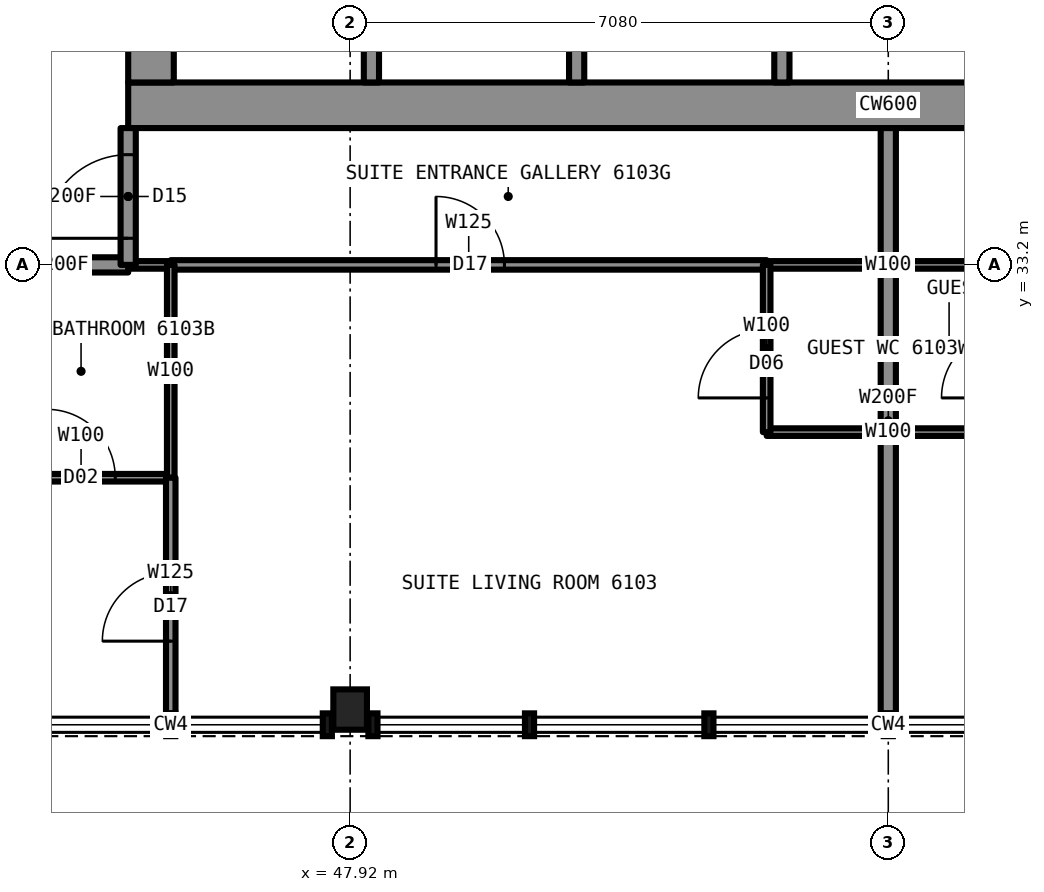
"""IFC4 building model, lengths in metres.
Left out: names, types, materials, properties, quantities, classifications, styles, units other than length and angle.
Written with IfcOpenShell. Run it as: python <this file> out.ifc"""

import sys

from ifc_helpers import new_model, si_unit, direction, frame, frame_2d, origin, origin_2d, place, context, subcontext, project, spatial, rectangle, i_section, extrude, element, fill, save


model = new_model("IFC4")
c1 = context("Model", 3, precision=1e-05, world=origin(), true_north=direction((0.0, 1.0)))
c2 = subcontext(c1, "Body", "Model", "MODEL_VIEW")
j1 = project(units=[si_unit("LENGTHUNIT", "METRE"), si_unit("PLANEANGLEUNIT", "RADIAN")], contexts=[c1])
p1 = place(None, origin())
s1 = spatial("IfcSite", under=j1, at=p1, CompositionType="ELEMENT")
p2 = place(p1, origin())
s2 = spatial("IfcBuilding", under=s1, at=p2, CompositionType="ELEMENT")
p3 = place(p2, frame((0.0, 0.0, 226.7)))
s3 = spatial("IfcBuildingStorey", under=s2, at=p3, CompositionType="ELEMENT", Elevation=226.7)
p4 = place(p3, frame((47.92, 27.35, 0.0), z_axis=(0.0, 0.0, 1.0), x_axis=(1.0, 0.0, 0.0)))
e1 = element("IfcColumn", 1, at=p4, inside=s3, PredefinedType="COLUMN", context=c2, shape_type="SweptSolid", body=[
    extrude(i_section(OverallWidth=0.442, OverallDepth=0.531, WebThickness=0.066, FlangeThickness=0.106, at=origin_2d()), origin(), (0.0, 0.0, 1.0), 3.5),
])
p5 = place(p3, frame((45.0, 35.3, 0.0), z_axis=(0.0, 0.0, 1.0), x_axis=(1.0, 0.0, 0.0)))
e2 = element("IfcWall", 2, at=p5, inside=s3, PredefinedType="SHEAR", context=c2, shape_type="SweptSolid", body=[
    extrude(rectangle(XDim=20.0, YDim=0.6, at=frame_2d((10.0, 0.0))), origin(), (0.0, 0.0, 1.0), 3.5),
])
p6 = place(p3, frame((45.3, 35.6, 0.0), z_axis=(0.0, 0.0, 1.0), x_axis=(0.0, 1.0, 0.0)))
e3 = element("IfcWall", 3, at=p6, inside=s3, PredefinedType="SHEAR", context=c2, shape_type="SweptSolid", body=[
    extrude(rectangle(XDim=18.8, YDim=0.6, at=frame_2d((9.4, 0.0))), origin(), (0.0, 0.0, 1.0), 3.5),
])
p7 = place(p6, frame((13.4, 0.0, 0.0)))
e4 = element("IfcOpeningElement", 4, at=p7, cuts=e3, PredefinedType="OPENING", context=c2, shape_type="SweptSolid", body=[
    extrude(rectangle(XDim=1.8, YDim=2.2, at=frame_2d((0.9, 1.1))), frame((0.0, 0.31, 0.0), z_axis=(0.0, -1.0, 0.0), x_axis=(1.0, 0.0, 0.0)), (0.0, 0.0, 1.0), 0.62),
])
p8 = place(p6, frame((3.6, 0.0, 0.0)))
e5 = element("IfcOpeningElement", 5, at=p8, cuts=e3, PredefinedType="OPENING", context=c2, shape_type="SweptSolid", body=[
    extrude(rectangle(XDim=1.8, YDim=2.2, at=frame_2d((0.9, 1.1))), frame((0.0, 0.31, 0.0), z_axis=(0.0, -1.0, 0.0), x_axis=(1.0, 0.0, 0.0)), (0.0, 0.0, 1.0), 0.62),
])
p9 = place(p6, frame((6.4, 0.0, 0.0)))
e6 = element("IfcOpeningElement", 6, at=p9, cuts=e3, PredefinedType="OPENING", context=c2, shape_type="SweptSolid", body=[
    extrude(rectangle(XDim=1.2, YDim=2.2, at=frame_2d((0.6, 1.1))), frame((0.0, 0.31, 0.0), z_axis=(0.0, -1.0, 0.0), x_axis=(1.0, 0.0, 0.0)), (0.0, 0.0, 1.0), 0.62),
])
p10 = place(p3, frame((45.0, 33.2, 0.0), z_axis=(0.0, 0.0, 1.0), x_axis=(1.0, 0.0, 0.0)))
e7 = element("IfcWall", 7, at=p10, inside=s3, PredefinedType="PARTITIONING", context=c2, shape_type="SweptSolid", body=[
    extrude(rectangle(XDim=0.56, YDim=0.1, at=frame_2d((0.28, 0.0))), origin(), (0.0, 0.0, 1.0), 3.33),
])
p11 = place(p3, frame((53.4, 33.2, 0.0), z_axis=(0.0, 0.0, 1.0), x_axis=(1.0, 0.0, 0.0)))
e8 = element("IfcWall", 8, at=p11, inside=s3, PredefinedType="PARTITIONING", context=c2, shape_type="SweptSolid", body=[
    extrude(rectangle(XDim=3.2, YDim=0.1, at=frame_2d((1.6, 0.0))), origin(), (0.0, 0.0, 1.0), 3.33),
])
p12 = place(p3, frame((43.2, 33.2, 0.0), z_axis=(0.0, 0.0, 1.0), x_axis=(1.0, 0.0, 0.0)))
e9 = element("IfcWall", 9, at=p12, inside=s3, PredefinedType="PARTITIONING", context=c2, shape_type="SweptSolid", body=[
    extrude(rectangle(XDim=1.8, YDim=0.2, at=frame_2d((0.9, 0.0))), origin(), (0.0, 0.0, 1.0), 3.33),
])
p13 = place(p3, frame((45.56, 33.2, 0.0), z_axis=(0.0, 0.0, 1.0), x_axis=(1.0, 0.0, 0.0)))
e10 = element("IfcWall", 10, at=p13, inside=s3, PredefinedType="PARTITIONING", context=c2, shape_type="SweptSolid", body=[
    extrude(rectangle(XDim=7.84, YDim=0.125, at=frame_2d((3.92, 0.0))), origin(), (0.0, 0.0, 1.0), 3.33),
])
p14 = place(p13, frame((3.49, 0.0, 0.0)))
e11 = element("IfcOpeningElement", 11, at=p14, cuts=e10, PredefinedType="OPENING", context=c2, shape_type="SweptSolid", body=[
    extrude(rectangle(XDim=0.9, YDim=2.2, at=frame_2d((0.45, 1.1))), frame((0.0, 0.073, 0.0), z_axis=(0.0, -1.0, 0.0), x_axis=(1.0, 0.0, 0.0)), (0.0, 0.0, 1.0), 0.145),
])
p15 = place(p3, frame((53.4, 31.0, 0.0), z_axis=(0.0, 0.0, 1.0), x_axis=(1.0, 0.0, 0.0)))
e12 = element("IfcWall", 12, at=p15, inside=s3, PredefinedType="PARTITIONING", context=c2, shape_type="SweptSolid", body=[
    extrude(rectangle(XDim=3.2, YDim=0.1, at=frame_2d((1.6, 0.0))), origin(), (0.0, 0.0, 1.0), 3.33),
])
p16 = place(p3, frame((43.2, 30.4, 0.0), z_axis=(0.0, 0.0, 1.0), x_axis=(1.0, 0.0, 0.0)))
e13 = element("IfcWall", 13, at=p16, inside=s3, PredefinedType="PARTITIONING", context=c2, shape_type="SweptSolid", body=[
    extrude(rectangle(XDim=2.36, YDim=0.1, at=frame_2d((1.18, 0.0))), origin(), (0.0, 0.0, 1.0), 3.33),
])
p17 = place(p16, frame((0.73, 0.0, 0.0)))
e14 = element("IfcOpeningElement", 14, at=p17, cuts=e13, PredefinedType="OPENING", context=c2, shape_type="SweptSolid", body=[
    extrude(rectangle(XDim=0.9, YDim=2.1, at=frame_2d((0.45, 1.05))), frame((0.0, 0.06, 0.0), z_axis=(0.0, -1.0, 0.0), x_axis=(1.0, 0.0, 0.0)), (0.0, 0.0, 1.0), 0.12),
])
p18 = place(p3, frame((53.4, 31.0, 0.0), z_axis=(0.0, 0.0, 1.0), x_axis=(0.0, 1.0, 0.0)))
e15 = element("IfcWall", 15, at=p18, inside=s3, PredefinedType="PARTITIONING", context=c2, shape_type="SweptSolid", body=[
    extrude(rectangle(XDim=2.2, YDim=0.1, at=frame_2d((1.1, 0.0))), origin(), (0.0, 0.0, 1.0), 3.33),
])
p19 = place(p18, frame((0.45, 0.0, 0.0)))
e16 = element("IfcOpeningElement", 16, at=p19, cuts=e15, PredefinedType="OPENING", context=c2, shape_type="SweptSolid", body=[
    extrude(rectangle(XDim=0.9, YDim=2.1, at=frame_2d((0.45, 1.05))), frame((0.0, 0.06, 0.0), z_axis=(0.0, -1.0, 0.0), x_axis=(1.0, 0.0, 0.0)), (0.0, 0.0, 1.0), 0.12),
])
p20 = place(p3, frame((45.0, 33.2, 0.0), z_axis=(0.0, 0.0, 1.0), x_axis=(0.0, 1.0, 0.0)))
e17 = element("IfcWall", 17, at=p20, inside=s3, PredefinedType="PARTITIONING", context=c2, shape_type="SweptSolid", body=[
    extrude(rectangle(XDim=1.8, YDim=0.2, at=frame_2d((0.9, 0.0))), origin(), (0.0, 0.0, 1.0), 3.33),
])
p21 = place(p20, frame((0.35, 0.0, 0.0)))
e18 = element("IfcOpeningElement", 18, at=p21, cuts=e17, PredefinedType="OPENING", context=c2, shape_type="SweptSolid", body=[
    extrude(rectangle(XDim=1.1, YDim=2.2, at=frame_2d((0.55, 1.1))), frame((0.0, 0.11, 0.0), z_axis=(0.0, -1.0, 0.0), x_axis=(1.0, 0.0, 0.0)), (0.0, 0.0, 1.0), 0.22),
])
p22 = place(p3, frame((45.56, 30.4, 0.0), z_axis=(0.0, 0.0, 1.0), x_axis=(0.0, 1.0, 0.0)))
e19 = element("IfcWall", 19, at=p22, inside=s3, PredefinedType="PARTITIONING", context=c2, shape_type="SweptSolid", body=[
    extrude(rectangle(XDim=2.8, YDim=0.1, at=frame_2d((1.4, 0.0))), origin(), (0.0, 0.0, 1.0), 3.33),
])
p23 = place(p3, frame((45.56, 27.3, 0.0), z_axis=(0.0, 0.0, 1.0), x_axis=(0.0, 1.0, 0.0)))
e20 = element("IfcWall", 20, at=p23, inside=s3, PredefinedType="PARTITIONING", context=c2, shape_type="SweptSolid", body=[
    extrude(rectangle(XDim=3.1, YDim=0.125, at=frame_2d((1.55, 0.0))), origin(), (0.0, 0.0, 1.0), 3.33),
])
p24 = place(p23, frame((0.95, 0.0, 0.0)))
e21 = element("IfcOpeningElement", 21, at=p24, cuts=e20, PredefinedType="OPENING", context=c2, shape_type="SweptSolid", body=[
    extrude(rectangle(XDim=0.9, YDim=2.2, at=frame_2d((0.45, 1.1))), frame((0.0, 0.073, 0.0), z_axis=(0.0, -1.0, 0.0), x_axis=(1.0, 0.0, 0.0)), (0.0, 0.0, 1.0), 0.145),
])
p25 = place(p3, frame((55.0, 27.3, 0.0), z_axis=(0.0, 0.0, 1.0), x_axis=(0.0, 1.0, 0.0)))
e22 = element("IfcWall", 22, at=p25, inside=s3, PredefinedType="PARTITIONING", context=c2, shape_type="SweptSolid", body=[
    extrude(rectangle(XDim=7.7, YDim=0.2, at=frame_2d((3.85, 0.0))), origin(), (0.0, 0.0, 1.0), 2.573),
])
for number, where, z_axis, x_axis in (
    (23, (48.2, 35.6, 0.0), (0.0, 0.0, 1.0), (0.0, 1.0, 0.0)),
    (24, (50.9, 35.6, 0.0), (0.0, 0.0, 1.0), (0.0, 1.0, 0.0)),
    (25, (53.6, 35.6, 0.0), (0.0, 0.0, 1.0), (0.0, 1.0, 0.0)),
):
    element("IfcWall", number, at=place(p3, frame(where, z_axis=z_axis, x_axis=x_axis)), inside=s3, PredefinedType="PARTITIONING", context=c2, shape_type="SweptSolid", body=[
        extrude(rectangle(XDim=2.7, YDim=0.2, at=frame_2d((1.35, 0.0))), origin(), (0.0, 0.0, 1.0), 3.33),
    ])
p26 = place(p14, origin())
e26 = element("IfcDoor", 26, at=p26, inside=s3, OperationType="SINGLE_SWING_LEFT", PredefinedType="DOOR", context=c2, shape_type="SweptSolid", body=[
    extrude(rectangle(XDim=0.9, YDim=2.2, at=frame_2d((0.45, 1.1))), frame((0.0, 0.025, 0.0), z_axis=(0.0, -1.0, 0.0), x_axis=(1.0, 0.0, 0.0)), (0.0, 0.0, 1.0), 0.05),
])
fill(e11, e26)
p27 = place(p17, origin())
e27 = element("IfcDoor", 27, at=p27, inside=s3, OperationType="SINGLE_SWING_RIGHT", PredefinedType="DOOR", context=c2, shape_type="SweptSolid", body=[
    extrude(rectangle(XDim=0.9, YDim=2.1, at=frame_2d((0.45, 1.05))), frame((0.0, 0.025, 0.0), z_axis=(0.0, -1.0, 0.0), x_axis=(1.0, 0.0, 0.0)), (0.0, 0.0, 1.0), 0.05),
])
fill(e14, e27)
p28 = place(p21, origin())
e28 = element("IfcDoor", 28, at=p28, inside=s3, OperationType="SINGLE_SWING_LEFT", PredefinedType="DOOR", context=c2, shape_type="SweptSolid", body=[
    extrude(rectangle(XDim=1.1, YDim=2.2, at=frame_2d((0.55, 1.1))), frame((0.0, 0.025, 0.0), z_axis=(0.0, -1.0, 0.0), x_axis=(1.0, 0.0, 0.0)), (0.0, 0.0, 1.0), 0.05),
])
fill(e18, e28)
p29 = place(p24, origin())
e29 = element("IfcDoor", 29, at=p29, inside=s3, OperationType="SINGLE_SWING_LEFT", PredefinedType="DOOR", context=c2, shape_type="SweptSolid", body=[
    extrude(rectangle(XDim=0.9, YDim=2.2, at=frame_2d((0.45, 1.1))), frame((0.0, 0.025, 0.0), z_axis=(0.0, -1.0, 0.0), x_axis=(1.0, 0.0, 0.0)), (0.0, 0.0, 1.0), 0.05),
])
fill(e21, e29)
p30 = place(p19, origin())
e30 = element("IfcDoor", 30, at=p30, inside=s3, OperationType="SINGLE_SWING_LEFT", PredefinedType="DOOR", context=c2, shape_type="SweptSolid", body=[
    extrude(rectangle(XDim=0.9, YDim=2.1, at=frame_2d((0.45, 1.05))), frame((0.0, 0.025, 0.0), z_axis=(0.0, -1.0, 0.0), x_axis=(1.0, 0.0, 0.0)), (0.0, 0.0, 1.0), 0.05),
])
fill(e16, e30)
save(model, sys.argv[1])
